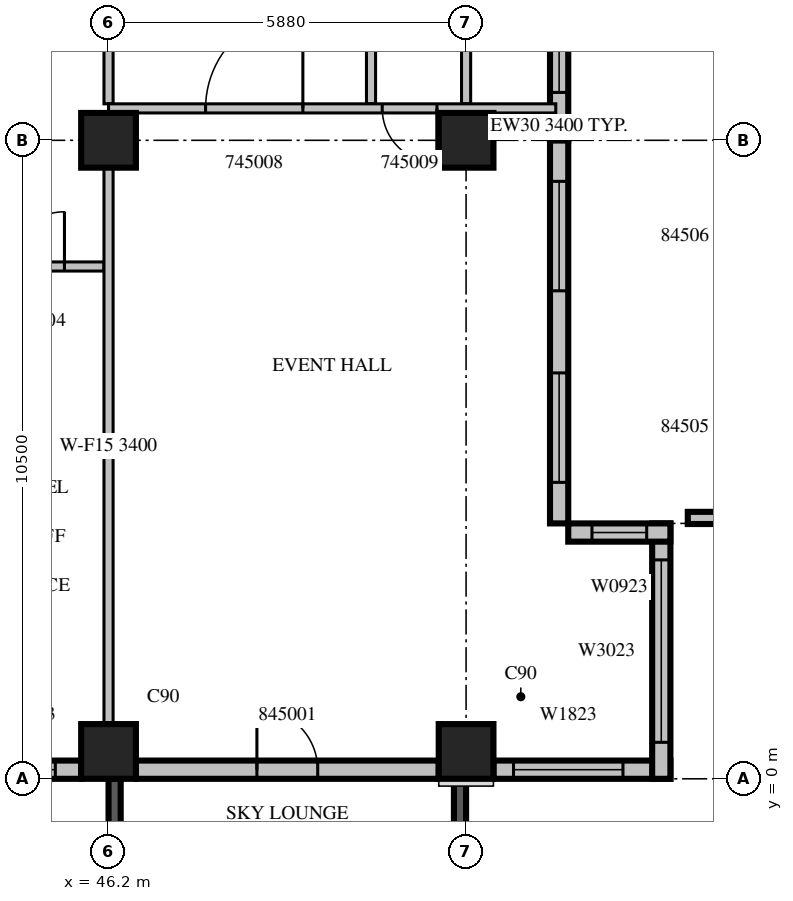
"""IFC4 building model, lengths in metres.
Left out: names, types, materials, properties, quantities, classifications, styles, units other than length and angle.
Written with IfcOpenShell. Run it as: python <this file> out.ifc"""

import sys

from ifc_helpers import new_model, si_unit, direction, frame, frame_2d, origin, origin_2d, place, context, subcontext, project, spatial, rectangle, extrude, source, transform, mapped, element, fill, save


model = new_model("IFC4")
c1 = context("Model", 3, precision=1e-05, world=origin(), true_north=direction((0.0, 1.0)))
c2 = subcontext(c1, "Body", "Model", "MODEL_VIEW")
j1 = project(units=[si_unit("LENGTHUNIT", "METRE"), si_unit("PLANEANGLEUNIT", "RADIAN")], contexts=[c1])
p1 = place(None, origin())
s1 = spatial("IfcSite", under=j1, at=p1, CompositionType="ELEMENT")
p2 = place(p1, origin())
s2 = spatial("IfcBuilding", under=s1, at=p2, CompositionType="ELEMENT")
p3 = place(p2, frame((0.0, 0.0, 204.4)))
s3 = spatial("IfcBuildingStorey", under=s2, at=p3, CompositionType="ELEMENT", Elevation=204.4)
m1 = source(origin(), c2, "Body", "SweptSolid", [
    extrude(rectangle(XDim=0.9, YDim=0.9, at=origin_2d()), origin(), (0.0, 0.0, 1.0), 3.8),
])
for number, where, z_axis, x_axis in (
    (1, (46.2, 0.45, 0.0), (0.0, 0.0, 1.0), (1.0, 0.0, 0.0)),
    (2, (52.08, 0.45, 0.0), (0.0, 0.0, 1.0), (1.0, 0.0, 0.0)),
    (3, (46.2, 10.5, 0.0), (0.0, 0.0, 1.0), (1.0, 0.0, 0.0)),
    (4, (52.08, 10.5, 0.0), (0.0, 0.0, 1.0), (1.0, 0.0, 0.0)),
):
    element("IfcColumn", number, at=place(p3, frame(where, z_axis=z_axis, x_axis=x_axis)), inside=s3, PredefinedType="COLUMN", context=c2, shape_type="MappedRepresentation", body=[
        mapped(m1, transform((0.0, 0.0, 0.0), scale=1.0)),
    ])
m2 = source(origin(), c2, "Body", "SweptSolid", [
    extrude(rectangle(XDim=3.9, YDim=0.2, at=frame_2d((1.95, 0.0))), origin(), (0.0, 0.0, 1.0), 3.4),
])
p4 = place(p3, frame((46.3, 0.0, 0.0), z_axis=(0.0, 0.0, 1.0), x_axis=(0.0, -1.0, 0.0)))
e5 = element("IfcWall", 5, at=p4, inside=s3, PredefinedType="SOLIDWALL", context=c2, shape_type="MappedRepresentation", body=[
    mapped(m2, transform((0.0, 0.0, 0.0), scale=1.0)),
])
m3 = source(origin(), c2, "Body", "SweptSolid", [
    extrude(rectangle(XDim=2.4, YDim=2.3, at=frame_2d((1.2, 1.15))), frame((0.0, 0.11, 0.0), z_axis=(0.0, -1.0, 0.0), x_axis=(1.0, 0.0, 0.0)), (0.0, 0.0, 1.0), 0.22),
])
p5 = place(p4, frame((0.75, 0.0, 0.6)))
e6 = element("IfcOpeningElement", 6, at=p5, cuts=e5, PredefinedType="OPENING", context=c2, shape_type="MappedRepresentation", body=[
    mapped(m3, transform((0.0, 0.0, 0.0), scale=1.0)),
])
p6 = place(p3, frame((51.98, 0.0, 0.0), z_axis=(0.0, 0.0, 1.0), x_axis=(0.0, -1.0, 0.0)))
e7 = element("IfcWall", 7, at=p6, inside=s3, PredefinedType="SOLIDWALL", context=c2, shape_type="MappedRepresentation", body=[
    mapped(m2, transform((0.0, 0.0, 0.0), scale=1.0)),
])
p7 = place(p6, frame((0.75, 0.0, 0.6)))
e8 = element("IfcOpeningElement", 8, at=p7, cuts=e7, PredefinedType="OPENING", context=c2, shape_type="MappedRepresentation", body=[
    mapped(m3, transform((0.0, 0.0, 0.0), scale=1.0)),
])
m4 = source(origin(), c2, "Body", "SweptSolid", [
    extrude(rectangle(XDim=1.75, YDim=0.3, at=frame_2d((0.875, 0.0))), origin(), (0.0, 0.0, 1.0), 3.4),
])
p8 = place(p3, frame((44.0, 0.15, 0.0), z_axis=(0.0, 0.0, 1.0), x_axis=(1.0, 0.0, 0.0)))
e9 = element("IfcWall", 9, at=p8, inside=s3, PredefinedType="STANDARD", context=c2, shape_type="MappedRepresentation", body=[
    mapped(m4, transform((0.0, 0.0, 0.0), scale=1.0)),
])
m5 = source(origin(), c2, "Body", "SweptSolid", [
    extrude(rectangle(XDim=0.9, YDim=2.3, at=frame_2d((0.45, 1.15))), frame((0.0, 0.16, 0.0), z_axis=(0.0, -1.0, 0.0), x_axis=(1.0, 0.0, 0.0)), (0.0, 0.0, 1.0), 0.32),
])
p9 = place(p8, frame((0.425, 0.0, 0.6)))
e10 = element("IfcOpeningElement", 10, at=p9, cuts=e9, PredefinedType="OPENING", context=c2, shape_type="MappedRepresentation", body=[
    mapped(m5, transform((0.0, 0.0, 0.0), scale=1.0)),
])
m6 = source(origin(), c2, "Body", "SweptSolid", [
    extrude(rectangle(XDim=4.98, YDim=0.3, at=frame_2d((2.49, 0.0))), origin(), (0.0, 0.0, 1.0), 3.4),
])
p10 = place(p3, frame((46.65, 0.15, 0.0), z_axis=(0.0, 0.0, 1.0), x_axis=(1.0, 0.0, 0.0)))
e11 = element("IfcWall", 11, at=p10, inside=s3, PredefinedType="STANDARD", context=c2, shape_type="MappedRepresentation", body=[
    mapped(m6, transform((0.0, 0.0, 0.0), scale=1.0)),
])
m7 = source(origin(), c2, "Body", "SweptSolid", [
    extrude(rectangle(XDim=1.0, YDim=2.1, at=frame_2d((0.5, 1.05))), frame((0.0, 0.16, 0.0), z_axis=(0.0, -1.0, 0.0), x_axis=(1.0, 0.0, 0.0)), (0.0, 0.0, 1.0), 0.32),
])
p11 = place(p10, frame((1.99, 0.0, 0.0)))
e12 = element("IfcOpeningElement", 12, at=p11, cuts=e11, PredefinedType="OPENING", context=c2, shape_type="MappedRepresentation", body=[
    mapped(m7, transform((0.0, 0.0, 0.0), scale=1.0)),
])
m8 = source(origin(), c2, "Body", "SweptSolid", [
    extrude(rectangle(XDim=2.91, YDim=0.3, at=frame_2d((1.455, 0.0))), origin(), (0.0, 0.0, 1.0), 3.4),
])
p12 = place(p3, frame((52.53, 0.15, 0.0), z_axis=(0.0, 0.0, 1.0), x_axis=(1.0, 0.0, 0.0)))
e13 = element("IfcWall", 13, at=p12, inside=s3, PredefinedType="STANDARD", context=c2, shape_type="MappedRepresentation", body=[
    mapped(m8, transform((0.0, 0.0, 0.0), scale=1.0)),
])
m9 = source(origin(), c2, "Body", "SweptSolid", [
    extrude(rectangle(XDim=1.8, YDim=2.3, at=frame_2d((0.9, 1.15))), frame((0.0, 0.16, 0.0), z_axis=(0.0, -1.0, 0.0), x_axis=(1.0, 0.0, 0.0)), (0.0, 0.0, 1.0), 0.32),
])
p13 = place(p12, frame((0.33, 0.0, 0.6)))
e14 = element("IfcOpeningElement", 14, at=p13, cuts=e13, PredefinedType="OPENING", context=c2, shape_type="MappedRepresentation", body=[
    mapped(m9, transform((0.0, 0.0, 0.0), scale=1.0)),
])
m10 = source(origin(), c2, "Body", "SweptSolid", [
    extrude(rectangle(XDim=4.2, YDim=0.3, at=frame_2d((2.1, 0.0))), origin(), (0.0, 0.0, 1.0), 3.4),
])
p14 = place(p3, frame((55.29, 0.0, 0.0), z_axis=(0.0, 0.0, 1.0), x_axis=(0.0, 1.0, 0.0)))
e15 = element("IfcWall", 15, at=p14, inside=s3, PredefinedType="STANDARD", context=c2, shape_type="MappedRepresentation", body=[
    mapped(m10, transform((0.0, 0.0, 0.0), scale=1.0)),
])
m11 = source(origin(), c2, "Body", "SweptSolid", [
    extrude(rectangle(XDim=3.0, YDim=2.3, at=frame_2d((1.5, 1.15))), frame((0.0, 0.16, 0.0), z_axis=(0.0, -1.0, 0.0), x_axis=(1.0, 0.0, 0.0)), (0.0, 0.0, 1.0), 0.32),
])
p15 = place(p14, frame((0.6, 0.0, 0.6)))
e16 = element("IfcOpeningElement", 16, at=p15, cuts=e15, PredefinedType="OPENING", context=c2, shape_type="MappedRepresentation", body=[
    mapped(m11, transform((0.0, 0.0, 0.0), scale=1.0)),
])
m12 = source(origin(), c2, "Body", "SweptSolid", [
    extrude(rectangle(XDim=1.68, YDim=0.3, at=frame_2d((0.84, 0.0))), origin(), (0.0, 0.0, 1.0), 3.4),
])
p16 = place(p3, frame((55.44, 4.05, 0.0), z_axis=(0.0, 0.0, 1.0), x_axis=(-1.0, 0.0, 0.0)))
e17 = element("IfcWall", 17, at=p16, inside=s3, PredefinedType="STANDARD", context=c2, shape_type="MappedRepresentation", body=[
    mapped(m12, transform((0.0, 0.0, 0.0), scale=1.0)),
])
p17 = place(p16, frame((0.39, 0.0, 0.6)))
e18 = element("IfcOpeningElement", 18, at=p17, cuts=e17, PredefinedType="OPENING", context=c2, shape_type="MappedRepresentation", body=[
    mapped(m5, transform((0.0, 0.0, 0.0), scale=1.0)),
])
m13 = source(origin(), c2, "Body", "SweptSolid", [
    extrude(rectangle(XDim=6.3, YDim=0.3, at=frame_2d((3.15, 0.0))), origin(), (0.0, 0.0, 1.0), 3.4),
])
p18 = place(p3, frame((53.61, 4.2, 0.0), z_axis=(0.0, 0.0, 1.0), x_axis=(0.0, 1.0, 0.0)))
e19 = element("IfcWall", 19, at=p18, inside=s3, PredefinedType="STANDARD", context=c2, shape_type="MappedRepresentation", body=[
    mapped(m13, transform((0.0, 0.0, 0.0), scale=1.0)),
])
m14 = source(origin(), c2, "Body", "SweptSolid", [
    extrude(rectangle(XDim=1.8, YDim=2.4, at=frame_2d((0.9, 1.2))), frame((0.0, 0.16, 0.0), z_axis=(0.0, -1.0, 0.0), x_axis=(1.0, 0.0, 0.0)), (0.0, 0.0, 1.0), 0.32),
])
p19 = place(p18, frame((0.675, 0.0, 0.0)))
e20 = element("IfcOpeningElement", 20, at=p19, cuts=e19, PredefinedType="OPENING", context=c2, shape_type="MappedRepresentation", body=[
    mapped(m14, transform((0.0, 0.0, 0.0), scale=1.0)),
])
p20 = place(p18, frame((3.825, 0.0, 0.0)))
e21 = element("IfcOpeningElement", 21, at=p20, cuts=e19, PredefinedType="OPENING", context=c2, shape_type="MappedRepresentation", body=[
    mapped(m14, transform((0.0, 0.0, 0.0), scale=1.0)),
])
m15 = source(origin(), c2, "Body", "SweptSolid", [
    extrude(rectangle(XDim=6.75, YDim=0.3, at=frame_2d((3.375, 0.0))), origin(), (0.0, 0.0, 1.0), 3.4),
])
p21 = place(p3, frame((53.61, 10.5, 0.0), z_axis=(0.0, 0.0, 1.0), x_axis=(0.0, 1.0, 0.0)))
e22 = element("IfcWall", 22, at=p21, inside=s3, PredefinedType="STANDARD", context=c2, shape_type="MappedRepresentation", body=[
    mapped(m15, transform((0.0, 0.0, 0.0), scale=1.0)),
])
p22 = place(p21, frame((0.787, 0.0, 0.0)))
e23 = element("IfcOpeningElement", 23, at=p22, cuts=e22, PredefinedType="OPENING", context=c2, shape_type="MappedRepresentation", body=[
    mapped(m14, transform((0.0, 0.0, 0.0), scale=1.0)),
])
m16 = source(origin(), c2, "Body", "SweptSolid", [
    extrude(rectangle(XDim=3.824, YDim=0.2, at=frame_2d((1.912, 0.0))), origin(), (0.0, 0.0, 1.0), 1.1),
])
p23 = place(p3, frame((59.55, 4.29, 0.0), z_axis=(0.0, 0.0, 1.0), x_axis=(-1.0, 0.0, 0.0)))
e24 = element("IfcWall", 24, at=p23, inside=s3, PredefinedType="PARAPET", context=c2, shape_type="MappedRepresentation", body=[
    mapped(m16, transform((0.0, 0.0, 0.0), scale=1.0)),
])
m17 = source(origin(), c2, "Body", "SweptSolid", [
    extrude(rectangle(XDim=2.2, YDim=0.15, at=frame_2d((1.1, 0.0))), origin(), (0.0, 0.0, 1.0), 3.4),
])
p24 = place(p3, frame((46.125, 8.425, 0.0), z_axis=(0.0, 0.0, 1.0), x_axis=(-1.0, 0.0, 0.0)))
e25 = element("IfcWall", 25, at=p24, inside=s3, PredefinedType="PARTITIONING", context=c2, shape_type="MappedRepresentation", body=[
    mapped(m17, transform((0.0, 0.0, 0.0), scale=1.0)),
])
m18 = source(origin(), c2, "Body", "SweptSolid", [
    extrude(rectangle(XDim=0.9, YDim=2.1, at=frame_2d((0.45, 1.05))), frame((0.0, 0.085, 0.0), z_axis=(0.0, -1.0, 0.0), x_axis=(1.0, 0.0, 0.0)), (0.0, 0.0, 1.0), 0.17),
])
p25 = place(p24, frame((0.65, 0.0, 0.0)))
e26 = element("IfcOpeningElement", 26, at=p25, cuts=e25, PredefinedType="OPENING", context=c2, shape_type="MappedRepresentation", body=[
    mapped(m18, transform((0.0, 0.0, 0.0), scale=1.0)),
])
m19 = source(origin(), c2, "Body", "SweptSolid", [
    extrude(rectangle(XDim=3.9, YDim=0.15, at=frame_2d((1.95, 0.0))), origin(), (0.0, 0.0, 1.0), 3.4),
])
p26 = place(p3, frame((50.517, 11.1, 0.0), z_axis=(0.0, 0.0, 1.0), x_axis=(0.0, 1.0, 0.0)))
e27 = element("IfcWall", 27, at=p26, inside=s3, PredefinedType="PARTITIONING", context=c2, shape_type="MappedRepresentation", body=[
    mapped(m19, transform((0.0, 0.0, 0.0), scale=1.0)),
])
p27 = place(p3, frame((52.08, 11.1, 0.0), z_axis=(0.0, 0.0, 1.0), x_axis=(0.0, 1.0, 0.0)))
e28 = element("IfcWall", 28, at=p27, inside=s3, PredefinedType="PARTITIONING", context=c2, shape_type="MappedRepresentation", body=[
    mapped(m19, transform((0.0, 0.0, 0.0), scale=1.0)),
])
p28 = place(p27, frame((1.5, 0.0, 0.0)))
e29 = element("IfcOpeningElement", 29, at=p28, cuts=e28, PredefinedType="OPENING", context=c2, shape_type="MappedRepresentation", body=[
    mapped(m18, transform((0.0, 0.0, 0.0), scale=1.0)),
])
m20 = source(origin(), c2, "Body", "SweptSolid", [
    extrude(rectangle(XDim=9.152, YDim=0.15, at=frame_2d((4.576, 0.0))), origin(), (0.0, 0.0, 1.0), 3.4),
])
p29 = place(p3, frame((46.2, 0.899, 0.0), z_axis=(0.0, 0.0, 1.0), x_axis=(0.0, 1.0, 0.0)))
e30 = element("IfcWall", 30, at=p29, inside=s3, PredefinedType="PARTITIONING", context=c2, shape_type="MappedRepresentation", body=[
    mapped(m20, transform((0.0, 0.0, 0.0), scale=1.0)),
])
p30 = place(p3, frame((46.2, 11.1, 0.0), z_axis=(0.0, 0.0, 1.0), x_axis=(0.0, 1.0, 0.0)))
e31 = element("IfcWall", 31, at=p30, inside=s3, PredefinedType="PARTITIONING", context=c2, shape_type="MappedRepresentation", body=[
    mapped(m19, transform((0.0, 0.0, 0.0), scale=1.0)),
])
p31 = place(p3, frame((53.555, 11.025, 0.0), z_axis=(0.0, 0.0, 1.0), x_axis=(-1.0, 0.0, 0.0)))
e32 = element("IfcWall", 32, at=p31, inside=s3, PredefinedType="PARTITIONING", context=c2, shape_type="SweptSolid", body=[
    extrude(rectangle(XDim=7.355, YDim=0.15, at=frame_2d((3.678, 0.0))), origin(), (0.0, 0.0, 1.0), 3.4),
])
m21 = source(origin(), c2, "Body", "SweptSolid", [
    extrude(rectangle(XDim=1.6, YDim=2.1, at=frame_2d((0.8, 1.05))), frame((0.0, 0.085, 0.0), z_axis=(0.0, -1.0, 0.0), x_axis=(1.0, 0.0, 0.0)), (0.0, 0.0, 1.0), 0.17),
])
p32 = place(p31, frame((4.159, 0.0, 0.0)))
e33 = element("IfcOpeningElement", 33, at=p32, cuts=e32, PredefinedType="OPENING", context=c2, shape_type="MappedRepresentation", body=[
    mapped(m21, transform((0.0, 0.0, 0.0), scale=1.0)),
])
p33 = place(p31, frame((1.954, 0.0, 0.0)))
e34 = element("IfcOpeningElement", 34, at=p33, cuts=e32, PredefinedType="OPENING", context=c2, shape_type="MappedRepresentation", body=[
    mapped(m18, transform((0.0, 0.0, 0.0), scale=1.0)),
])
m22 = source(origin(), c2, "Body", "SweptSolid", [
    extrude(rectangle(XDim=0.9, YDim=2.3, at=frame_2d((0.45, 1.15))), frame((0.0, 0.03, 0.0), z_axis=(0.0, -1.0, 0.0), x_axis=(1.0, 0.0, 0.0)), (0.0, 0.0, 1.0), 0.06),
])
p34 = place(p9, origin())
e35 = element("IfcWindow", 35, at=p34, inside=s3, PartitioningType="SINGLE_PANEL", PredefinedType="WINDOW", context=c2, shape_type="MappedRepresentation", body=[
    mapped(m22, transform((0.0, 0.0, 0.0), scale=1.0)),
])
fill(e10, e35)
m23 = source(origin(), c2, "Body", "SweptSolid", [
    extrude(rectangle(XDim=1.8, YDim=2.3, at=frame_2d((0.9, 1.15))), frame((0.0, 0.03, 0.0), z_axis=(0.0, -1.0, 0.0), x_axis=(1.0, 0.0, 0.0)), (0.0, 0.0, 1.0), 0.06),
])
p35 = place(p13, origin())
e36 = element("IfcWindow", 36, at=p35, inside=s3, PartitioningType="SINGLE_PANEL", PredefinedType="WINDOW", context=c2, shape_type="MappedRepresentation", body=[
    mapped(m23, transform((0.0, 0.0, 0.0), scale=1.0)),
])
fill(e14, e36)
m24 = source(origin(), c2, "Body", "SweptSolid", [
    extrude(rectangle(XDim=3.0, YDim=2.3, at=frame_2d((1.5, 1.15))), frame((0.0, 0.03, 0.0), z_axis=(0.0, -1.0, 0.0), x_axis=(1.0, 0.0, 0.0)), (0.0, 0.0, 1.0), 0.06),
])
p36 = place(p15, origin())
e37 = element("IfcWindow", 37, at=p36, inside=s3, PartitioningType="SINGLE_PANEL", PredefinedType="WINDOW", context=c2, shape_type="MappedRepresentation", body=[
    mapped(m24, transform((0.0, 0.0, 0.0), scale=1.0)),
])
fill(e16, e37)
p37 = place(p17, origin())
e38 = element("IfcWindow", 38, at=p37, inside=s3, PartitioningType="SINGLE_PANEL", PredefinedType="WINDOW", context=c2, shape_type="MappedRepresentation", body=[
    mapped(m22, transform((0.0, 0.0, 0.0), scale=1.0)),
])
fill(e18, e38)
m25 = source(origin(), c2, "Body", "SweptSolid", [
    extrude(rectangle(XDim=1.8, YDim=2.4, at=frame_2d((0.9, 1.2))), frame((0.0, 0.025, 0.0), z_axis=(0.0, -1.0, 0.0), x_axis=(1.0, 0.0, 0.0)), (0.0, 0.0, 1.0), 0.05),
])
p38 = place(p19, origin())
e39 = element("IfcDoor", 39, at=p38, inside=s3, OperationType="SLIDING_TO_LEFT", PredefinedType="DOOR", context=c2, shape_type="MappedRepresentation", body=[
    mapped(m25, transform((0.0, 0.0, 0.0), scale=1.0)),
])
fill(e20, e39)
p39 = place(p20, origin())
e40 = element("IfcDoor", 40, at=p39, inside=s3, OperationType="SLIDING_TO_LEFT", PredefinedType="DOOR", context=c2, shape_type="MappedRepresentation", body=[
    mapped(m25, transform((0.0, 0.0, 0.0), scale=1.0)),
])
fill(e21, e40)
p40 = place(p22, origin())
e41 = element("IfcDoor", 41, at=p40, inside=s3, OperationType="SLIDING_TO_LEFT", PredefinedType="DOOR", context=c2, shape_type="MappedRepresentation", body=[
    mapped(m25, transform((0.0, 0.0, 0.0), scale=1.0)),
])
fill(e23, e41)
m26 = source(origin(), c2, "Body", "SweptSolid", [
    extrude(rectangle(XDim=0.9, YDim=2.1, at=frame_2d((0.45, 1.05))), frame((0.0, 0.025, 0.0), z_axis=(0.0, -1.0, 0.0), x_axis=(1.0, 0.0, 0.0)), (0.0, 0.0, 1.0), 0.05),
])
p41 = place(p25, origin())
e42 = element("IfcDoor", 42, at=p41, inside=s3, OperationType="SINGLE_SWING_RIGHT", PredefinedType="DOOR", context=c2, shape_type="MappedRepresentation", body=[
    mapped(m26, transform((0.0, 0.0, 0.0), scale=1.0)),
])
fill(e26, e42)
m27 = source(origin(), c2, "Body", "SweptSolid", [
    extrude(rectangle(XDim=1.6, YDim=2.1, at=frame_2d((0.8, 1.05))), frame((0.0, 0.025, 0.0), z_axis=(0.0, -1.0, 0.0), x_axis=(1.0, 0.0, 0.0)), (0.0, 0.0, 1.0), 0.05),
])
p42 = place(p32, origin())
e43 = element("IfcDoor", 43, at=p42, inside=s3, OperationType="SINGLE_SWING_RIGHT", PredefinedType="DOOR", context=c2, shape_type="MappedRepresentation", body=[
    mapped(m27, transform((0.0, 0.0, 0.0), scale=1.0)),
])
fill(e33, e43)
p43 = place(p33, origin())
e44 = element("IfcDoor", 44, at=p43, inside=s3, OperationType="SINGLE_SWING_LEFT", PredefinedType="DOOR", context=c2, shape_type="MappedRepresentation", body=[
    mapped(m26, transform((0.0, 0.0, 0.0), scale=1.0)),
])
fill(e34, e44)
m28 = source(origin(), c2, "Body", "SweptSolid", [
    extrude(rectangle(XDim=1.0, YDim=2.1, at=frame_2d((0.5, 1.05))), frame((0.0, 0.025, 0.0), z_axis=(0.0, -1.0, 0.0), x_axis=(1.0, 0.0, 0.0)), (0.0, 0.0, 1.0), 0.05),
])
p44 = place(p11, origin())
e45 = element("IfcDoor", 45, at=p44, inside=s3, OperationType="SINGLE_SWING_LEFT", PredefinedType="DOOR", context=c2, shape_type="MappedRepresentation", body=[
    mapped(m28, transform((0.0, 0.0, 0.0), scale=1.0)),
])
fill(e12, e45)
save(model, sys.argv[1])
